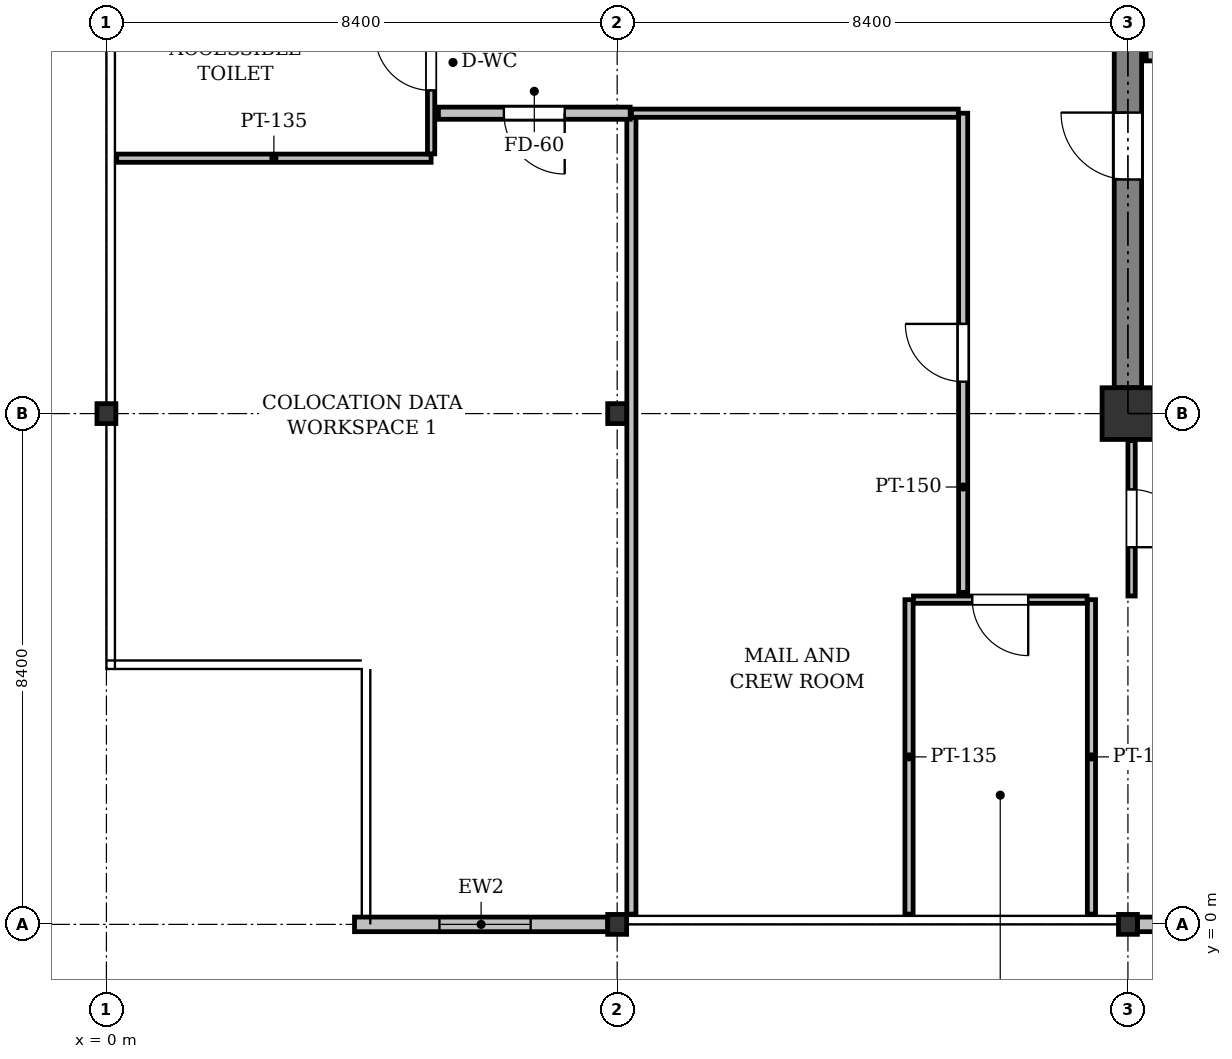
"""IFC4 building model, lengths in metres.
Left out: names, types, materials, properties, quantities, classifications, styles, units other than length and angle.
Written with IfcOpenShell. Run it as: python <this file> out.ifc"""

import sys

from ifc_helpers import new_model, si_unit, direction, frame, frame_2d, origin, origin_2d, place, context, subcontext, project, spatial, rectangle, i_section, extrude, element, fill, save


model = new_model("IFC4")
c1 = context("Model", 3, precision=1e-05, world=origin(), true_north=direction((0.0, 1.0)))
c2 = subcontext(c1, "Body", "Model", "MODEL_VIEW")
j1 = project(units=[si_unit("LENGTHUNIT", "METRE"), si_unit("PLANEANGLEUNIT", "RADIAN")], contexts=[c1])
p1 = place(None, origin())
s1 = spatial("IfcSite", under=j1, at=p1, CompositionType="ELEMENT")
p2 = place(p1, origin())
s2 = spatial("IfcBuilding", under=s1, at=p2, CompositionType="ELEMENT")
p3 = place(p2, frame((0.0, 0.0, 302.2)))
s3 = spatial("IfcBuildingStorey", under=s2, at=p3, CompositionType="ELEMENT", Elevation=302.2)
for number, where, z_axis, x_axis in (
    (1, (0.0, 8.4, 0.0), (0.0, 0.0, 1.0), (1.0, 0.0, 0.0)),
    (2, (8.4, 0.0, 0.0), (0.0, 0.0, 1.0), (1.0, 0.0, 0.0)),
    (3, (8.4, 8.4, 0.0), (0.0, 0.0, 1.0), (1.0, 0.0, 0.0)),
    (4, (16.8, 0.0, 0.0), (0.0, 0.0, 1.0), (1.0, 0.0, 0.0)),
):
    element("IfcColumn", number, at=place(p3, frame(where, z_axis=z_axis, x_axis=x_axis)), inside=s3, PredefinedType="COLUMN", context=c2, shape_type="SweptSolid", body=[
        extrude(i_section(OverallWidth=0.311, OverallDepth=0.327, WebThickness=0.016, FlangeThickness=0.025, FilletRadius=0.017, at=origin_2d()), origin(), (0.0, 0.0, 1.0), 4.0),
    ])
p4 = place(p3, frame((16.8, 8.4, 0.0), z_axis=(0.0, 0.0, 1.0), x_axis=(1.0, 0.0, 0.0)))
e5 = element("IfcColumn", 5, at=p4, inside=s3, PredefinedType="COLUMN", context=c2, shape_type="SweptSolid", body=[
    extrude(rectangle(XDim=0.85, YDim=0.85, at=origin_2d()), origin(), (0.0, 0.0, 1.0), 4.0),
])
p5 = place(p3, frame((25.044, 0.0, 0.0), z_axis=(0.0, 0.0, 1.0), x_axis=(-1.0, 0.0, 0.0)))
e6 = element("IfcWall", 6, at=p5, inside=s3, PredefinedType="STANDARD", context=c2, shape_type="SweptSolid", body=[
    extrude(rectangle(XDim=8.089, YDim=0.24, at=frame_2d((4.044, 0.0))), origin(), (0.0, 0.0, 1.0), 3.475),
])
p6 = place(p5, frame((3.294, 0.0, 0.9)))
e7 = element("IfcOpeningElement", 7, at=p6, cuts=e6, PredefinedType="OPENING", context=c2, shape_type="SweptSolid", body=[
    extrude(rectangle(XDim=1.5, YDim=1.6, at=frame_2d((0.75, 0.8))), frame((0.0, 0.13, 0.0), z_axis=(0.0, -1.0, 0.0), x_axis=(1.0, 0.0, 0.0)), (0.0, 0.0, 1.0), 0.26),
])
p7 = place(p3, frame((8.244, 0.0, 0.0), z_axis=(0.0, 0.0, 1.0), x_axis=(-1.0, 0.0, 0.0)))
e8 = element("IfcWall", 8, at=p7, inside=s3, PredefinedType="STANDARD", context=c2, shape_type="SweptSolid", body=[
    extrude(rectangle(XDim=4.164, YDim=0.24, at=frame_2d((2.082, 0.0))), origin(), (0.0, 0.0, 1.0), 3.725),
])
p8 = place(p7, frame((1.267, 0.0, 0.9)))
e9 = element("IfcOpeningElement", 9, at=p8, cuts=e8, PredefinedType="OPENING", context=c2, shape_type="SweptSolid", body=[
    extrude(rectangle(XDim=1.5, YDim=1.6, at=frame_2d((0.75, 0.8))), frame((0.0, 0.13, 0.0), z_axis=(0.0, -1.0, 0.0), x_axis=(1.0, 0.0, 0.0)), (0.0, 0.0, 1.0), 0.26),
])
p9 = place(p3, frame((16.8, 8.825, 0.0), z_axis=(0.0, 0.0, 1.0), x_axis=(0.0, 1.0, 0.0)))
e10 = element("IfcWall", 10, at=p9, inside=s3, PredefinedType="SHEAR", context=c2, shape_type="SweptSolid", body=[
    extrude(rectangle(XDim=7.55, YDim=0.45, at=frame_2d((3.775, 0.0))), origin(), (0.0, 0.0, 1.0), 3.725),
])
p10 = place(p9, frame((3.425, 0.0, 0.0)))
e11 = element("IfcOpeningElement", 11, at=p10, cuts=e10, PredefinedType="OPENING", context=c2, shape_type="SweptSolid", body=[
    extrude(rectangle(XDim=1.1, YDim=2.15, at=frame_2d((0.55, 1.075))), frame((0.0, 0.235, 0.0), z_axis=(0.0, -1.0, 0.0), x_axis=(1.0, 0.0, 0.0)), (0.0, 0.0, 1.0), 0.47),
])
p11 = place(p3, frame((17.2, 16.37, 0.0), z_axis=(0.0, 0.0, 1.0), x_axis=(0.0, -1.0, 0.0)))
e12 = element("IfcWall", 12, at=p11, inside=s3, PredefinedType="PARTITIONING", context=c2, shape_type="SweptSolid", body=[
    extrude(rectangle(XDim=2.17, YDim=0.2, at=frame_2d((1.085, 0.0))), origin(), (0.0, 0.0, 1.0), 3.725),
])
p12 = place(p3, frame((0.169, 12.6, 0.0), z_axis=(0.0, 0.0, 1.0), x_axis=(1.0, 0.0, 0.0)))
e13 = element("IfcWall", 13, at=p12, inside=s3, PredefinedType="PARTITIONING", context=c2, shape_type="SweptSolid", body=[
    extrude(rectangle(XDim=5.171, YDim=0.135, at=frame_2d((2.585, 0.0))), origin(), (0.0, 0.0, 1.0), 3.421),
])
p13 = place(p3, frame((5.34, 12.671, 0.0), z_axis=(0.0, 0.0, 1.0), x_axis=(0.0, 1.0, 0.0)))
e14 = element("IfcWall", 14, at=p13, inside=s3, PredefinedType="PARTITIONING", context=c2, shape_type="SweptSolid", body=[
    extrude(rectangle(XDim=3.007, YDim=0.12, at=frame_2d((1.503, 0.0))), origin(), (0.0, 0.0, 1.0), 3.725),
])
p14 = place(p13, frame((1.043, 0.0, 0.0)))
e15 = element("IfcOpeningElement", 15, at=p14, cuts=e14, PredefinedType="OPENING", context=c2, shape_type="SweptSolid", body=[
    extrude(rectangle(XDim=0.92, YDim=2.1, at=frame_2d((0.46, 1.05))), frame((0.0, 0.07, 0.0), z_axis=(0.0, -1.0, 0.0), x_axis=(1.0, 0.0, 0.0)), (0.0, 0.0, 1.0), 0.14),
])
for number, where, z_axis, x_axis in (
    (16, (13.2, 5.34, 0.0), (0.0, 0.0, 1.0), (0.0, -1.0, 0.0)),
    (17, (16.2, 0.169, 0.0), (0.0, 0.0, 1.0), (0.0, 1.0, 0.0)),
):
    element("IfcWall", number, at=place(p3, frame(where, z_axis=z_axis, x_axis=x_axis)), inside=s3, PredefinedType="PARTITIONING", context=c2, shape_type="SweptSolid", body=[
        extrude(rectangle(XDim=5.171, YDim=0.135, at=frame_2d((2.585, 0.0))), origin(), (0.0, 0.0, 1.0), 3.725),
    ])
p15 = place(p3, frame((16.128, 5.34, 0.0), z_axis=(0.0, 0.0, 1.0), x_axis=(-1.0, 0.0, 0.0)))
e18 = element("IfcWall", 18, at=p15, inside=s3, PredefinedType="PARTITIONING", context=c2, shape_type="SweptSolid", body=[
    extrude(rectangle(XDim=2.857, YDim=0.12, at=frame_2d((1.428, 0.0))), origin(), (0.0, 0.0, 1.0), 3.725),
])
p16 = place(p15, frame((0.969, 0.0, 0.0)))
e19 = element("IfcOpeningElement", 19, at=p16, cuts=e18, PredefinedType="OPENING", context=c2, shape_type="SweptSolid", body=[
    extrude(rectangle(XDim=0.92, YDim=2.1, at=frame_2d((0.46, 1.05))), frame((0.0, 0.07, 0.0), z_axis=(0.0, -1.0, 0.0), x_axis=(1.0, 0.0, 0.0)), (0.0, 0.0, 1.0), 0.14),
])
p17 = place(p3, frame((14.09, 5.46, 0.0), z_axis=(0.0, 0.0, 1.0), x_axis=(0.0, 1.0, 0.0)))
e20 = element("IfcWall", 20, at=p17, inside=s3, PredefinedType="PARTITIONING", context=c2, shape_type="SweptSolid", body=[
    extrude(rectangle(XDim=7.88, YDim=0.15, at=frame_2d((3.94, 0.0))), origin(), (0.0, 0.0, 1.0), 3.271),
])
p18 = place(p17, frame((3.465, 0.0, 0.0)))
e21 = element("IfcOpeningElement", 21, at=p18, cuts=e20, PredefinedType="OPENING", context=c2, shape_type="SweptSolid", body=[
    extrude(rectangle(XDim=0.95, YDim=2.15, at=frame_2d((0.475, 1.075))), frame((0.0, 0.085, 0.0), z_axis=(0.0, -1.0, 0.0), x_axis=(1.0, 0.0, 0.0)), (0.0, 0.0, 1.0), 0.17),
])
p19 = place(p3, frame((14.011, 13.34, 0.0), z_axis=(0.0, 0.0, 1.0), x_axis=(-1.0, 0.0, 0.0)))
e22 = element("IfcWall", 22, at=p19, inside=s3, PredefinedType="PARTITIONING", context=c2, shape_type="SweptSolid", body=[
    extrude(rectangle(XDim=5.377, YDim=0.135, at=frame_2d((2.688, 0.0))), origin(), (0.0, 0.0, 1.0), 3.421),
])
p20 = place(p3, frame((8.634, 13.269, 0.0), z_axis=(0.0, 0.0, 1.0), x_axis=(0.0, -1.0, 0.0)))
e23 = element("IfcWall", 23, at=p20, inside=s3, PredefinedType="PARTITIONING", context=c2, shape_type="SweptSolid", body=[
    extrude(rectangle(XDim=13.1, YDim=0.15, at=frame_2d((6.55, 0.0))), origin(), (0.0, 0.0, 1.0), 3.271),
])
p21 = place(p3, frame((8.614, 13.34, 0.0), z_axis=(0.0, 0.0, 1.0), x_axis=(-1.0, 0.0, 0.0)))
e24 = element("IfcWall", 24, at=p21, inside=s3, PredefinedType="PARTITIONING", context=c2, shape_type="SweptSolid", body=[
    extrude(rectangle(XDim=3.154, YDim=0.2, at=frame_2d((1.577, 0.0))), origin(), (0.0, 0.0, 1.0), 3.319),
])
p22 = place(p21, frame((1.077, 0.0, 0.0)))
e25 = element("IfcOpeningElement", 25, at=p22, cuts=e24, PredefinedType="OPENING", context=c2, shape_type="SweptSolid", body=[
    extrude(rectangle(XDim=1.0, YDim=2.15, at=frame_2d((0.5, 1.075))), frame((0.0, 0.11, 0.0), z_axis=(0.0, -1.0, 0.0), x_axis=(1.0, 0.0, 0.0)), (0.0, 0.0, 1.0), 0.22),
])
p23 = place(p3, frame((16.86, 7.955, 0.0), z_axis=(0.0, 0.0, 1.0), x_axis=(0.0, -1.0, 0.0)))
e26 = element("IfcWall", 26, at=p23, inside=s3, PredefinedType="PARTITIONING", context=c2, shape_type="SweptSolid", body=[
    extrude(rectangle(XDim=2.555, YDim=0.12, at=frame_2d((1.278, 0.0))), origin(), (0.0, 0.0, 1.0), 3.319),
])
p24 = place(p23, frame((0.802, 0.0, 0.0)))
e27 = element("IfcOpeningElement", 27, at=p24, cuts=e26, PredefinedType="OPENING", context=c2, shape_type="SweptSolid", body=[
    extrude(rectangle(XDim=0.95, YDim=2.15, at=frame_2d((0.475, 1.075))), frame((0.0, 0.07, 0.0), z_axis=(0.0, -1.0, 0.0), x_axis=(1.0, 0.0, 0.0)), (0.0, 0.0, 1.0), 0.14),
])
p25 = place(p8, origin())
e28 = element("IfcWindow", 28, at=p25, inside=s3, PartitioningType="SINGLE_PANEL", PredefinedType="WINDOW", context=c2, shape_type="SweptSolid", body=[
    extrude(rectangle(XDim=1.5, YDim=1.6, at=frame_2d((0.75, 0.8))), frame((0.0, 0.03, 0.0), z_axis=(0.0, -1.0, 0.0), x_axis=(1.0, 0.0, 0.0)), (0.0, 0.0, 1.0), 0.06),
])
fill(e9, e28)
p26 = place(p10, origin())
e29 = element("IfcDoor", 29, at=p26, inside=s3, OperationType="SINGLE_SWING_RIGHT", PredefinedType="DOOR", context=c2, shape_type="SweptSolid", body=[
    extrude(rectangle(XDim=1.1, YDim=2.15, at=frame_2d((0.55, 1.075))), frame((0.0, 0.025, 0.0), z_axis=(0.0, -1.0, 0.0), x_axis=(1.0, 0.0, 0.0)), (0.0, 0.0, 1.0), 0.05),
])
fill(e11, e29)
p27 = place(p14, origin())
e30 = element("IfcDoor", 30, at=p27, inside=s3, OperationType="SINGLE_SWING_RIGHT", PredefinedType="DOOR", context=c2, shape_type="SweptSolid", body=[
    extrude(rectangle(XDim=0.92, YDim=2.1, at=frame_2d((0.46, 1.05))), frame((0.0, 0.025, 0.0), z_axis=(0.0, -1.0, 0.0), x_axis=(1.0, 0.0, 0.0)), (0.0, 0.0, 1.0), 0.05),
])
fill(e15, e30)
p28 = place(p16, origin())
e31 = element("IfcDoor", 31, at=p28, inside=s3, OperationType="SINGLE_SWING_LEFT", PredefinedType="DOOR", context=c2, shape_type="SweptSolid", body=[
    extrude(rectangle(XDim=0.92, YDim=2.1, at=frame_2d((0.46, 1.05))), frame((0.0, 0.025, 0.0), z_axis=(0.0, -1.0, 0.0), x_axis=(1.0, 0.0, 0.0)), (0.0, 0.0, 1.0), 0.05),
])
fill(e19, e31)
p29 = place(p18, origin())
e32 = element("IfcDoor", 32, at=p29, inside=s3, OperationType="SINGLE_SWING_RIGHT", PredefinedType="DOOR", context=c2, shape_type="SweptSolid", body=[
    extrude(rectangle(XDim=0.95, YDim=2.15, at=frame_2d((0.475, 1.075))), frame((0.0, 0.025, 0.0), z_axis=(0.0, -1.0, 0.0), x_axis=(1.0, 0.0, 0.0)), (0.0, 0.0, 1.0), 0.05),
])
fill(e21, e32)
p30 = place(p22, origin())
e33 = element("IfcDoor", 33, at=p30, inside=s3, OperationType="SINGLE_SWING_LEFT", PredefinedType="DOOR", context=c2, shape_type="SweptSolid", body=[
    extrude(rectangle(XDim=1.0, YDim=2.15, at=frame_2d((0.5, 1.075))), frame((0.0, 0.025, 0.0), z_axis=(0.0, -1.0, 0.0), x_axis=(1.0, 0.0, 0.0)), (0.0, 0.0, 1.0), 0.05),
])
fill(e25, e33)
p31 = place(p24, origin())
e34 = element("IfcDoor", 34, at=p31, inside=s3, OperationType="SINGLE_SWING_RIGHT", PredefinedType="DOOR", context=c2, shape_type="SweptSolid", body=[
    extrude(rectangle(XDim=0.95, YDim=2.15, at=frame_2d((0.475, 1.075))), frame((0.0, 0.025, 0.0), z_axis=(0.0, -1.0, 0.0), x_axis=(1.0, 0.0, 0.0)), (0.0, 0.0, 1.0), 0.05),
])
fill(e27, e34)
save(model, sys.argv[1])
